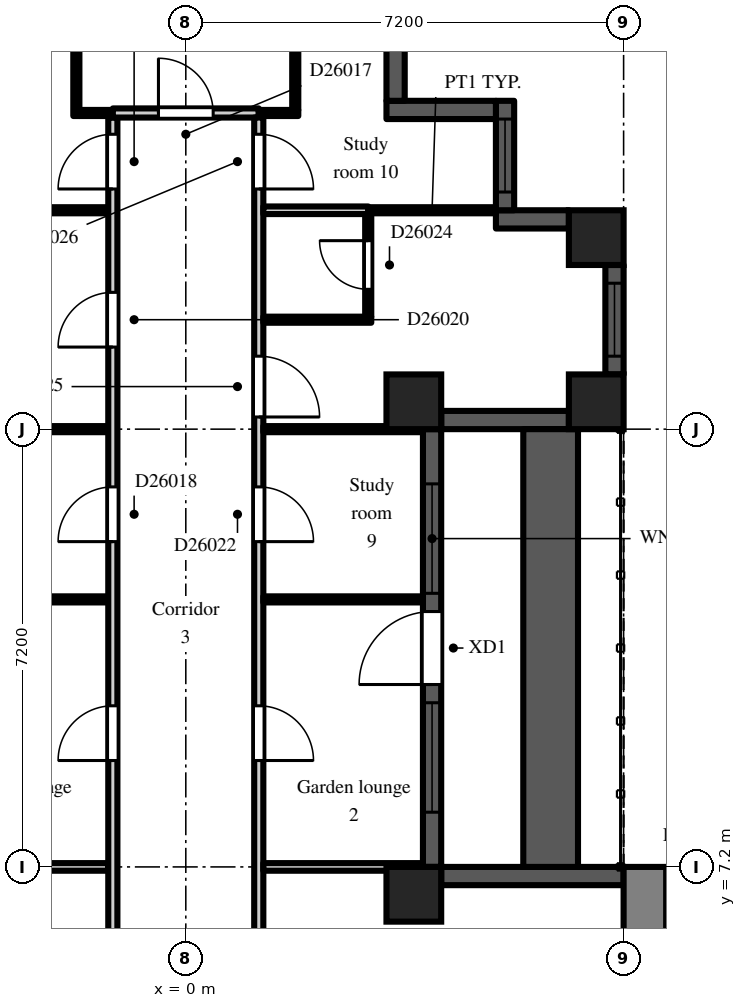
"""IFC4 building model, lengths in metres.
Left out: names, types, materials, properties, quantities, classifications, styles, units other than length and angle.
Written with IfcOpenShell. Run it as: python <this file> out.ifc"""

import sys

from ifc_helpers import new_model, si_unit, direction, frame, frame_2d, origin, origin_2d, place, context, subcontext, project, spatial, rectangle, extrude, element, fill, save


model = new_model("IFC4")
c1 = context("Model", 3, precision=1e-05, world=origin(), true_north=direction((0.0, 1.0)))
c2 = subcontext(c1, "Body", "Model", "MODEL_VIEW")
j1 = project(units=[si_unit("LENGTHUNIT", "METRE"), si_unit("PLANEANGLEUNIT", "RADIAN")], contexts=[c1])
p1 = place(None, origin())
s1 = spatial("IfcSite", under=j1, at=p1, CompositionType="ELEMENT")
p2 = place(p1, origin())
s2 = spatial("IfcBuilding", under=s1, at=p2, CompositionType="ELEMENT")
p3 = place(p2, frame((0.0, 0.0, 179.7)))
s3 = spatial("IfcBuildingStorey", under=s2, at=p3, CompositionType="ELEMENT", Elevation=179.7)
for number, where, z_axis, x_axis in (
    (1, (3.75, 6.75, 0.0), (0.0, 0.0, 1.0), (1.0, 0.0, 0.0)),
    (2, (3.75, 14.85, 0.0), (0.0, 0.0, 1.0), (1.0, 0.0, 0.0)),
    (3, (6.75, 14.85, 0.0), (0.0, 0.0, 1.0), (1.0, 0.0, 0.0)),
    (4, (6.75, 17.55, 0.0), (0.0, 0.0, 1.0), (1.0, 0.0, 0.0)),
):
    element("IfcColumn", number, at=place(p3, frame(where, z_axis=z_axis, x_axis=x_axis)), inside=s3, PredefinedType="COLUMN", context=c2, shape_type="SweptSolid", body=[
        extrude(rectangle(XDim=0.9, YDim=0.9, at=origin_2d()), origin(), (0.0, 0.0, 1.0), 3.0),
    ])
p4 = place(p3, frame((7.2, 7.05, 0.0), z_axis=(0.0, 0.0, 1.0), x_axis=(-1.0, 0.0, 0.0)))
e5 = element("IfcWall", 5, at=p4, inside=s3, PredefinedType="SOLIDWALL", context=c2, shape_type="SweptSolid", body=[
    extrude(rectangle(XDim=3.0, YDim=0.3, at=frame_2d((1.5, 0.0))), origin(), (0.0, 0.0, 1.0), 2.2),
])
p5 = place(p3, frame((4.05, 7.2, 0.0), z_axis=(0.0, 0.0, 1.0), x_axis=(0.0, 1.0, 0.0)))
e6 = element("IfcWall", 6, at=p5, inside=s3, PredefinedType="SOLIDWALL", context=c2, shape_type="SweptSolid", body=[
    extrude(rectangle(XDim=7.2, YDim=0.3, at=frame_2d((3.6, 0.0))), origin(), (0.0, 0.0, 1.0), 2.2),
])
p6 = place(p5, frame((3.0, 0.0, 0.0)))
e7 = element("IfcOpeningElement", 7, at=p6, cuts=e6, PredefinedType="OPENING", context=c2, shape_type="SweptSolid", body=[
    extrude(rectangle(XDim=1.2, YDim=2.05, at=frame_2d((0.6, 1.025))), frame((0.0, 0.16, 0.0), z_axis=(0.0, -1.0, 0.0), x_axis=(1.0, 0.0, 0.0)), (0.0, 0.0, 1.0), 0.32),
])
p7 = place(p5, frame((0.9, 0.0, 0.2)))
e8 = element("IfcOpeningElement", 8, at=p7, cuts=e6, PredefinedType="OPENING", context=c2, shape_type="SweptSolid", body=[
    extrude(rectangle(XDim=1.8, YDim=1.85, at=frame_2d((0.9, 0.925))), frame((0.0, 0.16, 0.0), z_axis=(0.0, -1.0, 0.0), x_axis=(1.0, 0.0, 0.0)), (0.0, 0.0, 1.0), 0.32),
])
p8 = place(p5, frame((4.5, 0.0, 0.2)))
e9 = element("IfcOpeningElement", 9, at=p8, cuts=e6, PredefinedType="OPENING", context=c2, shape_type="SweptSolid", body=[
    extrude(rectangle(XDim=1.8, YDim=1.85, at=frame_2d((0.9, 0.925))), frame((0.0, 0.16, 0.0), z_axis=(0.0, -1.0, 0.0), x_axis=(1.0, 0.0, 0.0)), (0.0, 0.0, 1.0), 0.32),
])
p9 = place(p3, frame((4.2, 14.55, 0.0), z_axis=(0.0, 0.0, 1.0), x_axis=(1.0, 0.0, 0.0)))
e10 = element("IfcWall", 10, at=p9, inside=s3, PredefinedType="SOLIDWALL", context=c2, shape_type="SweptSolid", body=[
    extrude(rectangle(XDim=2.1, YDim=0.3, at=frame_2d((1.05, 0.0))), origin(), (0.0, 0.0, 1.0), 2.2),
])
p10 = place(p3, frame((7.05, 15.3, 0.0), z_axis=(0.0, 0.0, 1.0), x_axis=(0.0, 1.0, 0.0)))
e11 = element("IfcWall", 11, at=p10, inside=s3, PredefinedType="SOLIDWALL", context=c2, shape_type="SweptSolid", body=[
    extrude(rectangle(XDim=1.8, YDim=0.3, at=frame_2d((0.9, 0.0))), origin(), (0.0, 0.0, 1.0), 2.2),
])
p11 = place(p10, frame((0.3, 0.0, 0.2)))
e12 = element("IfcOpeningElement", 12, at=p11, cuts=e11, PredefinedType="OPENING", context=c2, shape_type="SweptSolid", body=[
    extrude(rectangle(XDim=1.2, YDim=1.85, at=frame_2d((0.6, 0.925))), frame((0.0, 0.16, 0.0), z_axis=(0.0, -1.0, 0.0), x_axis=(1.0, 0.0, 0.0)), (0.0, 0.0, 1.0), 0.32),
])
p12 = place(p3, frame((6.3, 17.85, 0.0), z_axis=(0.0, 0.0, 1.0), x_axis=(-1.0, 0.0, 0.0)))
e13 = element("IfcWall", 13, at=p12, inside=s3, PredefinedType="SOLIDWALL", context=c2, shape_type="SweptSolid", body=[
    extrude(rectangle(XDim=1.2, YDim=0.3, at=frame_2d((0.6, 0.0))), origin(), (0.0, 0.0, 1.0), 2.6),
])
p13 = place(p3, frame((5.25, 18.0, 0.0), z_axis=(0.0, 0.0, 1.0), x_axis=(0.0, 1.0, 0.0)))
e14 = element("IfcWall", 14, at=p13, inside=s3, PredefinedType="SOLIDWALL", context=c2, shape_type="SweptSolid", body=[
    extrude(rectangle(XDim=1.8, YDim=0.3, at=frame_2d((0.9, 0.0))), origin(), (0.0, 0.0, 1.0), 2.6),
])
p14 = place(p13, frame((0.3, 0.0, 0.2)))
e15 = element("IfcOpeningElement", 15, at=p14, cuts=e14, PredefinedType="OPENING", context=c2, shape_type="SweptSolid", body=[
    extrude(rectangle(XDim=1.2, YDim=1.85, at=frame_2d((0.6, 0.925))), frame((0.0, 0.16, 0.0), z_axis=(0.0, -1.0, 0.0), x_axis=(1.0, 0.0, 0.0)), (0.0, 0.0, 1.0), 0.32),
])
p15 = place(p3, frame((5.1, 19.65, 0.0), z_axis=(0.0, 0.0, 1.0), x_axis=(-1.0, 0.0, 0.0)))
e16 = element("IfcWall", 16, at=p15, inside=s3, PredefinedType="SOLIDWALL", context=c2, shape_type="SweptSolid", body=[
    extrude(rectangle(XDim=1.8, YDim=0.3, at=frame_2d((0.9, 0.0))), origin(), (0.0, 0.0, 1.0), 2.6),
])
p16 = place(p3, frame((3.45, 19.8, 0.0), z_axis=(0.0, 0.0, 1.0), x_axis=(0.0, 1.0, 0.0)))
e17 = element("IfcWall", 17, at=p16, inside=s3, PredefinedType="SOLIDWALL", context=c2, shape_type="SweptSolid", body=[
    extrude(rectangle(XDim=0.9, YDim=0.3, at=frame_2d((0.45, 0.0))), origin(), (0.0, 0.0, 1.0), 2.6),
])
p17 = place(p3, frame((6.0, 7.2, 0.0), z_axis=(0.0, 0.0, 1.0), x_axis=(0.0, 1.0, 0.0)))
e18 = element("IfcWall", 18, at=p17, inside=s3, PredefinedType="PARAPET", context=c2, shape_type="SweptSolid", body=[
    extrude(rectangle(XDim=7.2, YDim=0.9, at=frame_2d((3.6, 0.0))), origin(), (0.0, 0.0, 1.0), 0.8),
])
p18 = place(p3, frame((7.55, -7.2, 0.0), z_axis=(0.0, 0.0, 1.0), x_axis=(0.0, 1.0, 0.0)))
e19 = element("IfcWall", 19, at=p18, inside=s3, PredefinedType="SHEAR", context=c2, shape_type="SweptSolid", body=[
    extrude(rectangle(XDim=14.4, YDim=0.7, at=frame_2d((7.2, 0.0))), origin(), (0.0, 0.0, 1.0), 2.6),
])
p19 = place(p18, frame((6.0, 0.0, 0.0)))
e20 = element("IfcOpeningElement", 20, at=p19, cuts=e19, PredefinedType="OPENING", context=c2, shape_type="SweptSolid", body=[
    extrude(rectangle(XDim=2.4, YDim=2.2, at=frame_2d((1.2, 1.1))), frame((0.0, 0.36, 0.0), z_axis=(0.0, -1.0, 0.0), x_axis=(1.0, 0.0, 0.0)), (0.0, 0.0, 1.0), 0.72),
])
p20 = place(p3, frame((-5.1, 18.0, 0.0), z_axis=(0.0, 0.0, 1.0), x_axis=(1.0, 0.0, 0.0)))
e21 = element("IfcWall", 21, at=p20, inside=s3, PredefinedType="PARTITIONING", context=c2, shape_type="SweptSolid", body=[
    extrude(rectangle(XDim=3.825, YDim=0.1, at=frame_2d((1.913, 0.0))), origin(), (0.0, 0.0, 1.0), 2.6),
])
p21 = place(p3, frame((-3.9, 7.2, 0.0), z_axis=(0.0, 0.0, 1.0), x_axis=(1.0, 0.0, 0.0)))
e22 = element("IfcWall", 22, at=p21, inside=s3, PredefinedType="PARTITIONING", context=c2, shape_type="SweptSolid", body=[
    extrude(rectangle(XDim=2.625, YDim=0.125, at=frame_2d((1.312, 0.0))), origin(), (0.0, 0.0, 1.0), 2.6),
])
for number, where, z_axis, x_axis in (
    (23, (-3.9, 11.6, 0.0), (0.0, 0.0, 1.0), (1.0, 0.0, 0.0)),
    (24, (-3.9, 14.4, 0.0), (0.0, 0.0, 1.0), (1.0, 0.0, 0.0)),
):
    element("IfcWall", number, at=place(p3, frame(where, z_axis=z_axis, x_axis=x_axis)), inside=s3, PredefinedType="PARTITIONING", context=c2, shape_type="SweptSolid", body=[
        extrude(rectangle(XDim=2.625, YDim=0.1, at=frame_2d((1.312, 0.0))), origin(), (0.0, 0.0, 1.0), 2.6),
    ])
p22 = place(p3, frame((-1.8, 19.55, 0.0), z_axis=(0.0, 0.0, 1.0), x_axis=(0.0, 1.0, 0.0)))
e25 = element("IfcWall", 25, at=p22, inside=s3, PredefinedType="PARTITIONING", context=c2, shape_type="SweptSolid", body=[
    extrude(rectangle(XDim=1.75, YDim=0.1, at=frame_2d((0.875, 0.0))), origin(), (0.0, 0.0, 1.0), 2.6),
])
p23 = place(p3, frame((-1.75, 19.6, 0.0), z_axis=(0.0, 0.0, 1.0), x_axis=(1.0, 0.0, 0.0)))
e26 = element("IfcWall", 26, at=p23, inside=s3, PredefinedType="PARTITIONING", context=c2, shape_type="SweptSolid", body=[
    extrude(rectangle(XDim=0.55, YDim=0.1, at=frame_2d((0.275, 0.0))), origin(), (0.0, 0.0, 1.0), 2.6),
])
p24 = place(p3, frame((-1.2, 1.275, 0.0), z_axis=(0.0, 0.0, 1.0), x_axis=(0.0, 1.0, 0.0)))
e27 = element("IfcWall", 27, at=p24, inside=s3, PredefinedType="PARTITIONING", context=c2, shape_type="SweptSolid", body=[
    extrude(rectangle(XDim=18.25, YDim=0.15, at=frame_2d((9.125, 0.0))), origin(), (0.0, 0.0, 1.0), 2.6),
])
p25 = place(p24, frame((2.475, 0.0, 0.0)))
e28 = element("IfcOpeningElement", 28, at=p25, cuts=e27, PredefinedType="OPENING", context=c2, shape_type="SweptSolid", body=[
    extrude(rectangle(XDim=0.9, YDim=2.1, at=frame_2d((0.45, 1.05))), frame((0.0, 0.085, 0.0), z_axis=(0.0, -1.0, 0.0), x_axis=(1.0, 0.0, 0.0)), (0.0, 0.0, 1.0), 0.17),
])
p26 = place(p24, frame((11.275, 0.0, 0.0)))
e29 = element("IfcOpeningElement", 29, at=p26, cuts=e27, PredefinedType="OPENING", context=c2, shape_type="SweptSolid", body=[
    extrude(rectangle(XDim=0.9, YDim=2.1, at=frame_2d((0.45, 1.05))), frame((0.0, 0.085, 0.0), z_axis=(0.0, -1.0, 0.0), x_axis=(1.0, 0.0, 0.0)), (0.0, 0.0, 1.0), 0.17),
])
p27 = place(p24, frame((7.675, 0.0, 0.0)))
e30 = element("IfcOpeningElement", 30, at=p27, cuts=e27, PredefinedType="OPENING", context=c2, shape_type="SweptSolid", body=[
    extrude(rectangle(XDim=0.9, YDim=2.1, at=frame_2d((0.45, 1.05))), frame((0.0, 0.085, 0.0), z_axis=(0.0, -1.0, 0.0), x_axis=(1.0, 0.0, 0.0)), (0.0, 0.0, 1.0), 0.17),
])
p28 = place(p24, frame((14.475, 0.0, 0.0)))
e31 = element("IfcOpeningElement", 31, at=p28, cuts=e27, PredefinedType="OPENING", context=c2, shape_type="SweptSolid", body=[
    extrude(rectangle(XDim=0.9, YDim=2.1, at=frame_2d((0.45, 1.05))), frame((0.0, 0.085, 0.0), z_axis=(0.0, -1.0, 0.0), x_axis=(1.0, 0.0, 0.0)), (0.0, 0.0, 1.0), 0.17),
])
p29 = place(p24, frame((17.075, 0.0, 0.0)))
e32 = element("IfcOpeningElement", 32, at=p29, cuts=e27, PredefinedType="OPENING", context=c2, shape_type="SweptSolid", body=[
    extrude(rectangle(XDim=0.9, YDim=2.1, at=frame_2d((0.45, 1.05))), frame((0.0, 0.085, 0.0), z_axis=(0.0, -1.0, 0.0), x_axis=(1.0, 0.0, 0.0)), (0.0, 0.0, 1.0), 0.17),
])
p30 = place(p3, frame((-1.2, 19.6, 0.0), z_axis=(0.0, 0.0, 1.0), x_axis=(1.0, 0.0, 0.0)))
e33 = element("IfcWall", 33, at=p30, inside=s3, PredefinedType="PARTITIONING", context=c2, shape_type="SweptSolid", body=[
    extrude(rectangle(XDim=2.4, YDim=0.15, at=frame_2d((1.2, 0.0))), origin(), (0.0, 0.0, 1.0), 2.6),
])
p31 = place(p30, frame((0.75, 0.0, 0.0)))
e34 = element("IfcOpeningElement", 34, at=p31, cuts=e33, PredefinedType="OPENING", context=c2, shape_type="SweptSolid", body=[
    extrude(rectangle(XDim=0.9, YDim=2.1, at=frame_2d((0.45, 1.05))), frame((0.0, 0.085, 0.0), z_axis=(0.0, -1.0, 0.0), x_axis=(1.0, 0.0, 0.0)), (0.0, 0.0, 1.0), 0.17),
])
p32 = place(p3, frame((1.2, 1.125, 0.0), z_axis=(0.0, 0.0, 1.0), x_axis=(0.0, 1.0, 0.0)))
e35 = element("IfcWall", 35, at=p32, inside=s3, PredefinedType="PARTITIONING", context=c2, shape_type="SweptSolid", body=[
    extrude(rectangle(XDim=18.4, YDim=0.15, at=frame_2d((9.2, 0.0))), origin(), (0.0, 0.0, 1.0), 2.6),
])
p33 = place(p32, frame((3.825, 0.0, 0.0)))
e36 = element("IfcOpeningElement", 36, at=p33, cuts=e35, PredefinedType="OPENING", context=c2, shape_type="SweptSolid", body=[
    extrude(rectangle(XDim=0.9, YDim=2.1, at=frame_2d((0.45, 1.05))), frame((0.0, 0.085, 0.0), z_axis=(0.0, -1.0, 0.0), x_axis=(1.0, 0.0, 0.0)), (0.0, 0.0, 1.0), 0.17),
])
p34 = place(p32, frame((11.425, 0.0, 0.0)))
e37 = element("IfcOpeningElement", 37, at=p34, cuts=e35, PredefinedType="OPENING", context=c2, shape_type="SweptSolid", body=[
    extrude(rectangle(XDim=0.9, YDim=2.1, at=frame_2d((0.45, 1.05))), frame((0.0, 0.085, 0.0), z_axis=(0.0, -1.0, 0.0), x_axis=(1.0, 0.0, 0.0)), (0.0, 0.0, 1.0), 0.17),
])
p35 = place(p32, frame((7.825, 0.0, 0.0)))
e38 = element("IfcOpeningElement", 38, at=p35, cuts=e35, PredefinedType="OPENING", context=c2, shape_type="SweptSolid", body=[
    extrude(rectangle(XDim=0.9, YDim=2.1, at=frame_2d((0.45, 1.05))), frame((0.0, 0.085, 0.0), z_axis=(0.0, -1.0, 0.0), x_axis=(1.0, 0.0, 0.0)), (0.0, 0.0, 1.0), 0.17),
])
p36 = place(p32, frame((13.475, 0.0, 0.0)))
e39 = element("IfcOpeningElement", 39, at=p36, cuts=e35, PredefinedType="OPENING", context=c2, shape_type="SweptSolid", body=[
    extrude(rectangle(XDim=1.0, YDim=2.1, at=frame_2d((0.5, 1.05))), frame((0.0, 0.085, 0.0), z_axis=(0.0, -1.0, 0.0), x_axis=(1.0, 0.0, 0.0)), (0.0, 0.0, 1.0), 0.17),
])
p37 = place(p32, frame((17.225, 0.0, 0.0)))
e40 = element("IfcOpeningElement", 40, at=p37, cuts=e35, PredefinedType="OPENING", context=c2, shape_type="SweptSolid", body=[
    extrude(rectangle(XDim=0.9, YDim=2.1, at=frame_2d((0.45, 1.05))), frame((0.0, 0.085, 0.0), z_axis=(0.0, -1.0, 0.0), x_axis=(1.0, 0.0, 0.0)), (0.0, 0.0, 1.0), 0.17),
])
p38 = place(p3, frame((1.275, 7.2, 0.0), z_axis=(0.0, 0.0, 1.0), x_axis=(1.0, 0.0, 0.0)))
e41 = element("IfcWall", 41, at=p38, inside=s3, PredefinedType="PARTITIONING", context=c2, shape_type="SweptSolid", body=[
    extrude(rectangle(XDim=2.625, YDim=0.125, at=frame_2d((1.312, 0.0))), origin(), (0.0, 0.0, 1.0), 2.6),
])
for number, where, z_axis, x_axis in (
    (42, (1.275, 11.6, 0.0), (0.0, 0.0, 1.0), (1.0, 0.0, 0.0)),
    (43, (1.275, 14.4, 0.0), (0.0, 0.0, 1.0), (1.0, 0.0, 0.0)),
):
    element("IfcWall", number, at=place(p3, frame(where, z_axis=z_axis, x_axis=x_axis)), inside=s3, PredefinedType="PARTITIONING", context=c2, shape_type="SweptSolid", body=[
        extrude(rectangle(XDim=2.625, YDim=0.1, at=frame_2d((1.312, 0.0))), origin(), (0.0, 0.0, 1.0), 2.6),
    ])
p39 = place(p3, frame((1.275, 16.2, 0.0), z_axis=(0.0, 0.0, 1.0), x_axis=(1.0, 0.0, 0.0)))
e44 = element("IfcWall", 44, at=p39, inside=s3, PredefinedType="PARTITIONING", context=c2, shape_type="SweptSolid", body=[
    extrude(rectangle(XDim=1.775, YDim=0.1, at=frame_2d((0.888, 0.0))), origin(), (0.0, 0.0, 1.0), 2.6),
])
p40 = place(p3, frame((1.275, 18.0, 0.0), z_axis=(0.0, 0.0, 1.0), x_axis=(1.0, 0.0, 0.0)))
e45 = element("IfcWall", 45, at=p40, inside=s3, PredefinedType="PARTITIONING", context=c2, shape_type="SweptSolid", body=[
    extrude(rectangle(XDim=1.725, YDim=0.125, at=frame_2d((0.863, 0.0))), origin(), (0.0, 0.0, 1.0), 2.6),
])
p41 = place(p3, frame((1.2, 19.6, 0.0), z_axis=(0.0, 0.0, 1.0), x_axis=(1.0, 0.0, 0.0)))
e46 = element("IfcWall", 46, at=p41, inside=s3, PredefinedType="PARTITIONING", context=c2, shape_type="SweptSolid", body=[
    extrude(rectangle(XDim=0.65, YDim=0.1, at=frame_2d((0.325, 0.0))), origin(), (0.0, 0.0, 1.0), 2.6),
])
p42 = place(p3, frame((1.8, 19.65, 0.0), z_axis=(0.0, 0.0, 1.0), x_axis=(0.0, 1.0, 0.0)))
e47 = element("IfcWall", 47, at=p42, inside=s3, PredefinedType="PARTITIONING", context=c2, shape_type="SweptSolid", body=[
    extrude(rectangle(XDim=1.65, YDim=0.1, at=frame_2d((0.825, 0.0))), origin(), (0.0, 0.0, 1.0), 2.6),
])
p43 = place(p3, frame((3.0, 16.25, 0.0), z_axis=(0.0, 0.0, 1.0), x_axis=(0.0, 1.0, 0.0)))
e48 = element("IfcWall", 48, at=p43, inside=s3, PredefinedType="PARTITIONING", context=c2, shape_type="SweptSolid", body=[
    extrude(rectangle(XDim=1.688, YDim=0.1, at=frame_2d((0.844, 0.0))), origin(), (0.0, 0.0, 1.0), 2.6),
])
p44 = place(p43, frame((0.45, 0.0, 0.0)))
e49 = element("IfcOpeningElement", 49, at=p44, cuts=e48, PredefinedType="OPENING", context=c2, shape_type="SweptSolid", body=[
    extrude(rectangle(XDim=0.8, YDim=2.1, at=frame_2d((0.4, 1.05))), frame((0.0, 0.06, 0.0), z_axis=(0.0, -1.0, 0.0), x_axis=(1.0, 0.0, 0.0)), (0.0, 0.0, 1.0), 0.12),
])
p45 = place(p3, frame((3.0, 18.0, 0.0), z_axis=(0.0, 0.0, 1.0), x_axis=(1.0, 0.0, 0.0)))
e50 = element("IfcWall", 50, at=p45, inside=s3, PredefinedType="PARTITIONING", context=c2, shape_type="SweptSolid", body=[
    extrude(rectangle(XDim=2.1, YDim=0.1, at=frame_2d((1.05, 0.0))), origin(), (0.0, 0.0, 1.0), 2.6),
])
p46 = place(p6, origin())
e51 = element("IfcDoor", 51, at=p46, inside=s3, OperationType="SINGLE_SWING_LEFT", PredefinedType="DOOR", context=c2, shape_type="SweptSolid", body=[
    extrude(rectangle(XDim=1.2, YDim=2.05, at=frame_2d((0.6, 1.025))), frame((0.0, 0.025, 0.0), z_axis=(0.0, -1.0, 0.0), x_axis=(1.0, 0.0, 0.0)), (0.0, 0.0, 1.0), 0.05),
])
fill(e7, e51)
p47 = place(p7, origin())
e52 = element("IfcWindow", 52, at=p47, inside=s3, PartitioningType="SINGLE_PANEL", PredefinedType="WINDOW", context=c2, shape_type="SweptSolid", body=[
    extrude(rectangle(XDim=1.8, YDim=1.85, at=frame_2d((0.9, 0.925))), frame((0.0, 0.03, 0.0), z_axis=(0.0, -1.0, 0.0), x_axis=(1.0, 0.0, 0.0)), (0.0, 0.0, 1.0), 0.06),
])
fill(e8, e52)
p48 = place(p8, origin())
e53 = element("IfcWindow", 53, at=p48, inside=s3, PartitioningType="SINGLE_PANEL", PredefinedType="WINDOW", context=c2, shape_type="SweptSolid", body=[
    extrude(rectangle(XDim=1.8, YDim=1.85, at=frame_2d((0.9, 0.925))), frame((0.0, 0.03, 0.0), z_axis=(0.0, -1.0, 0.0), x_axis=(1.0, 0.0, 0.0)), (0.0, 0.0, 1.0), 0.06),
])
fill(e9, e53)
p49 = place(p11, origin())
e54 = element("IfcWindow", 54, at=p49, inside=s3, PartitioningType="SINGLE_PANEL", PredefinedType="WINDOW", context=c2, shape_type="SweptSolid", body=[
    extrude(rectangle(XDim=1.2, YDim=1.85, at=frame_2d((0.6, 0.925))), frame((0.0, 0.03, 0.0), z_axis=(0.0, -1.0, 0.0), x_axis=(1.0, 0.0, 0.0)), (0.0, 0.0, 1.0), 0.06),
])
fill(e12, e54)
p50 = place(p14, origin())
e55 = element("IfcWindow", 55, at=p50, inside=s3, PartitioningType="SINGLE_PANEL", PredefinedType="WINDOW", context=c2, shape_type="SweptSolid", body=[
    extrude(rectangle(XDim=1.2, YDim=1.85, at=frame_2d((0.6, 0.925))), frame((0.0, 0.03, 0.0), z_axis=(0.0, -1.0, 0.0), x_axis=(1.0, 0.0, 0.0)), (0.0, 0.0, 1.0), 0.06),
])
fill(e15, e55)
p51 = place(p31, origin())
e56 = element("IfcDoor", 56, at=p51, inside=s3, OperationType="SINGLE_SWING_LEFT", PredefinedType="DOOR", context=c2, shape_type="SweptSolid", body=[
    extrude(rectangle(XDim=0.9, YDim=2.1, at=frame_2d((0.45, 1.05))), frame((0.0, 0.025, 0.0), z_axis=(0.0, -1.0, 0.0), x_axis=(1.0, 0.0, 0.0)), (0.0, 0.0, 1.0), 0.05),
])
fill(e34, e56)
p52 = place(p26, origin())
e57 = element("IfcDoor", 57, at=p52, inside=s3, OperationType="SINGLE_SWING_LEFT", PredefinedType="DOOR", context=c2, shape_type="SweptSolid", body=[
    extrude(rectangle(XDim=0.9, YDim=2.1, at=frame_2d((0.45, 1.05))), frame((0.0, 0.025, 0.0), z_axis=(0.0, -1.0, 0.0), x_axis=(1.0, 0.0, 0.0)), (0.0, 0.0, 1.0), 0.05),
])
fill(e29, e57)
p53 = place(p27, origin())
e58 = element("IfcDoor", 58, at=p53, inside=s3, OperationType="SINGLE_SWING_LEFT", PredefinedType="DOOR", context=c2, shape_type="SweptSolid", body=[
    extrude(rectangle(XDim=0.9, YDim=2.1, at=frame_2d((0.45, 1.05))), frame((0.0, 0.025, 0.0), z_axis=(0.0, -1.0, 0.0), x_axis=(1.0, 0.0, 0.0)), (0.0, 0.0, 1.0), 0.05),
])
fill(e30, e58)
p54 = place(p28, origin())
e59 = element("IfcDoor", 59, at=p54, inside=s3, OperationType="SINGLE_SWING_LEFT", PredefinedType="DOOR", context=c2, shape_type="SweptSolid", body=[
    extrude(rectangle(XDim=0.9, YDim=2.1, at=frame_2d((0.45, 1.05))), frame((0.0, 0.025, 0.0), z_axis=(0.0, -1.0, 0.0), x_axis=(1.0, 0.0, 0.0)), (0.0, 0.0, 1.0), 0.05),
])
fill(e31, e59)
p55 = place(p29, origin())
e60 = element("IfcDoor", 60, at=p55, inside=s3, OperationType="SINGLE_SWING_LEFT", PredefinedType="DOOR", context=c2, shape_type="SweptSolid", body=[
    extrude(rectangle(XDim=0.9, YDim=2.1, at=frame_2d((0.45, 1.05))), frame((0.0, 0.025, 0.0), z_axis=(0.0, -1.0, 0.0), x_axis=(1.0, 0.0, 0.0)), (0.0, 0.0, 1.0), 0.05),
])
fill(e32, e60)
p56 = place(p34, frame((0.9, 0.0, 0.0), z_axis=(0.0, 0.0, 1.0), x_axis=(-1.0, 0.0, 0.0)))
e61 = element("IfcDoor", 61, at=p56, inside=s3, OperationType="SINGLE_SWING_RIGHT", PredefinedType="DOOR", context=c2, shape_type="SweptSolid", body=[
    extrude(rectangle(XDim=0.9, YDim=2.1, at=frame_2d((0.45, 1.05))), frame((0.0, 0.025, 0.0), z_axis=(0.0, -1.0, 0.0), x_axis=(1.0, 0.0, 0.0)), (0.0, 0.0, 1.0), 0.05),
])
fill(e37, e61)
p57 = place(p35, frame((0.9, 0.0, 0.0), z_axis=(0.0, 0.0, 1.0), x_axis=(-1.0, 0.0, 0.0)))
e62 = element("IfcDoor", 62, at=p57, inside=s3, OperationType="SINGLE_SWING_RIGHT", PredefinedType="DOOR", context=c2, shape_type="SweptSolid", body=[
    extrude(rectangle(XDim=0.9, YDim=2.1, at=frame_2d((0.45, 1.05))), frame((0.0, 0.025, 0.0), z_axis=(0.0, -1.0, 0.0), x_axis=(1.0, 0.0, 0.0)), (0.0, 0.0, 1.0), 0.05),
])
fill(e38, e62)
p58 = place(p44, origin())
e63 = element("IfcDoor", 63, at=p58, inside=s3, OperationType="SINGLE_SWING_RIGHT", PredefinedType="DOOR", context=c2, shape_type="SweptSolid", body=[
    extrude(rectangle(XDim=0.8, YDim=2.1, at=frame_2d((0.4, 1.05))), frame((0.0, 0.025, 0.0), z_axis=(0.0, -1.0, 0.0), x_axis=(1.0, 0.0, 0.0)), (0.0, 0.0, 1.0), 0.05),
])
fill(e49, e63)
p59 = place(p36, frame((1.0, 0.0, 0.0), z_axis=(0.0, 0.0, 1.0), x_axis=(-1.0, 0.0, 0.0)))
e64 = element("IfcDoor", 64, at=p59, inside=s3, OperationType="SINGLE_SWING_RIGHT", PredefinedType="DOOR", context=c2, shape_type="SweptSolid", body=[
    extrude(rectangle(XDim=1.0, YDim=2.1, at=frame_2d((0.5, 1.05))), frame((0.0, 0.025, 0.0), z_axis=(0.0, -1.0, 0.0), x_axis=(1.0, 0.0, 0.0)), (0.0, 0.0, 1.0), 0.05),
])
fill(e39, e64)
p60 = place(p37, frame((0.9, 0.0, 0.0), z_axis=(0.0, 0.0, 1.0), x_axis=(-1.0, 0.0, 0.0)))
e65 = element("IfcDoor", 65, at=p60, inside=s3, OperationType="SINGLE_SWING_RIGHT", PredefinedType="DOOR", context=c2, shape_type="SweptSolid", body=[
    extrude(rectangle(XDim=0.9, YDim=2.1, at=frame_2d((0.45, 1.05))), frame((0.0, 0.025, 0.0), z_axis=(0.0, -1.0, 0.0), x_axis=(1.0, 0.0, 0.0)), (0.0, 0.0, 1.0), 0.05),
])
fill(e40, e65)
save(model, sys.argv[1])
